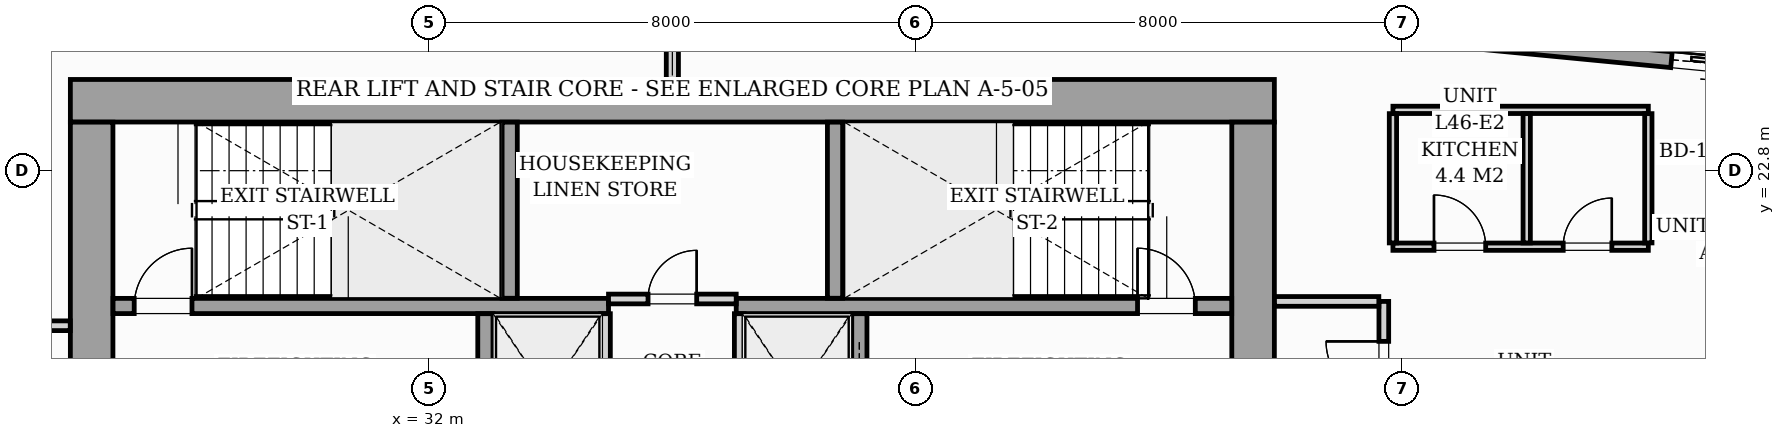
"""IFC4 building model, lengths in metres.
Left out: names, types, materials, properties, quantities, classifications, styles, units other than length and angle.
Written with IfcOpenShell. Run it as: python <this file> out.ifc"""

import sys

from ifc_helpers import new_model, si_unit, direction, frame, frame_2d, origin, origin_2d, place, context, subcontext, project, spatial, rectangle, i_section, extrude, source, transform, mapped, element, fill, save


model = new_model("IFC4")
c1 = context("Model", 3, precision=1e-05, world=origin(), true_north=direction((0.0, 1.0)))
c2 = subcontext(c1, "Body", "Model", "MODEL_VIEW")
j1 = project(units=[si_unit("LENGTHUNIT", "METRE"), si_unit("PLANEANGLEUNIT", "RADIAN")], contexts=[c1])
p1 = place(None, origin())
s1 = spatial("IfcSite", under=j1, at=p1, CompositionType="ELEMENT")
p2 = place(p1, origin())
s2 = spatial("IfcBuilding", under=s1, at=p2, CompositionType="ELEMENT")
p3 = place(p2, frame((0.0, 0.0, 159.8)))
s3 = spatial("IfcBuildingStorey", under=s2, at=p3, CompositionType="ELEMENT", Elevation=159.8)
m1 = source(origin(), c2, "Body", "SweptSolid", [
    extrude(i_section(OverallWidth=0.421, OverallDepth=0.465, WebThickness=0.045, FlangeThickness=0.073, FilletRadius=0.018, at=origin_2d()), origin(), (0.0, 0.0, 1.0), 3.196),
])
for number, where, z_axis, x_axis in (
    (1, (26.4, 24.0, 0.002), (0.0, 0.0, 1.0), (1.0, 0.0, 0.0)),
    (2, (33.12, 24.0, 0.002), (0.0, 0.0, 1.0), (1.0, 0.0, 0.0)),
    (3, (38.88, 24.0, 0.002), (0.0, 0.0, 1.0), (1.0, 0.0, 0.0)),
    (4, (45.6, 24.0, 0.002), (0.0, 0.0, 1.0), (1.0, 0.0, 0.0)),
):
    element("IfcColumn", number, at=place(p3, frame(where, z_axis=z_axis, x_axis=x_axis)), inside=s3, PredefinedType="PILASTER", context=c2, shape_type="MappedRepresentation", body=[
        mapped(m1, transform((0.0, 0.0, 0.0), scale=1.0)),
    ])
p4 = place(p3, frame((40.983, 25.727, 0.0), z_axis=(0.0, 0.0, 1.0), x_axis=(0.995395844771, -0.095849424686, 0.0)))
e5 = element("IfcWall", 5, at=p4, inside=s3, PredefinedType="STANDARD", context=c2, shape_type="SweptSolid", body=[
    extrude(rectangle(XDim=17.01, YDim=0.26, at=frame_2d((8.505, 0.0))), origin(), (0.0, 0.0, 1.0), 2.9),
])
p5 = place(p4, frame((11.5, 0.0, 0.0)))
e6 = element("IfcOpeningElement", 6, at=p5, cuts=e5, PredefinedType="OPENING", context=c2, shape_type="SweptSolid", body=[
    extrude(rectangle(XDim=1.8, YDim=2.06, at=frame_2d((0.9, 1.03))), frame((0.0, 0.14, 0.0), z_axis=(0.0, -1.0, 0.0), x_axis=(1.0, 0.0, 0.0)), (0.0, 0.0, 1.0), 0.28),
])
p6 = place(p4, frame((0.7, 0.0, 0.65)))
e7 = element("IfcOpeningElement", 7, at=p6, cuts=e5, PredefinedType="OPENING", context=c2, shape_type="SweptSolid", body=[
    extrude(rectangle(XDim=1.6, YDim=1.5, at=frame_2d((0.8, 0.75))), frame((0.0, 0.14, 0.0), z_axis=(0.0, -1.0, 0.0), x_axis=(1.0, 0.0, 0.0)), (0.0, 0.0, 1.0), 0.28),
])
p7 = place(p3, frame((26.1, 23.95, 0.0), z_axis=(0.0, 0.0, 1.0), x_axis=(1.0, 0.0, 0.0)))
e8 = element("IfcWall", 8, at=p7, inside=s3, PredefinedType="SHEAR", context=c2, shape_type="SweptSolid", body=[
    extrude(rectangle(XDim=19.8, YDim=0.7, at=frame_2d((9.9, 0.0))), origin(), (0.0, 0.0, 1.0), 3.2),
])
for number, where, z_axis, x_axis in (
    (9, (26.45, 17.802, 0.0), (0.0, 0.0, 1.0), (0.0, 1.0, 0.0)),
    (10, (45.55, 17.802, 0.0), (0.0, 0.0, 1.0), (0.0, 1.0, 0.0)),
):
    element("IfcWall", number, at=place(p3, frame(where, z_axis=z_axis, x_axis=x_axis)), inside=s3, PredefinedType="SHEAR", context=c2, shape_type="SweptSolid", body=[
        extrude(rectangle(XDim=5.796, YDim=0.7, at=frame_2d((2.898, 0.0))), origin(), (0.0, 0.0, 1.0), 3.2),
    ])
p8 = place(p3, frame((26.802, 20.575, 0.0), z_axis=(0.0, 0.0, 1.0), x_axis=(1.0, 0.0, 0.0)))
e11 = element("IfcWall", 11, at=p8, inside=s3, PredefinedType="SOLIDWALL", context=c2, shape_type="SweptSolid", body=[
    extrude(rectangle(XDim=8.148, YDim=0.25, at=frame_2d((4.074, 0.0))), origin(), (0.0, 0.0, 1.0), 3.2),
])
p9 = place(p8, frame((0.348, 0.0, 0.0)))
e12 = element("IfcOpeningElement", 12, at=p9, cuts=e11, PredefinedType="OPENING", context=c2, shape_type="SweptSolid", body=[
    extrude(rectangle(XDim=0.95, YDim=2.06, at=frame_2d((0.475, 1.03))), frame((0.0, 0.135, 0.0), z_axis=(0.0, -1.0, 0.0), x_axis=(1.0, 0.0, 0.0)), (0.0, 0.0, 1.0), 0.27),
])
p10 = place(p3, frame((37.05, 20.575, 0.0), z_axis=(0.0, 0.0, 1.0), x_axis=(1.0, 0.0, 0.0)))
e13 = element("IfcWall", 13, at=p10, inside=s3, PredefinedType="SOLIDWALL", context=c2, shape_type="SweptSolid", body=[
    extrude(rectangle(XDim=8.148, YDim=0.25, at=frame_2d((4.074, 0.0))), origin(), (0.0, 0.0, 1.0), 3.2),
])
p11 = place(p10, frame((6.6, 0.0, 0.0)))
e14 = element("IfcOpeningElement", 14, at=p11, cuts=e13, PredefinedType="OPENING", context=c2, shape_type="SweptSolid", body=[
    extrude(rectangle(XDim=0.95, YDim=2.06, at=frame_2d((0.475, 1.03))), frame((0.0, 0.135, 0.0), z_axis=(0.0, -1.0, 0.0), x_axis=(1.0, 0.0, 0.0)), (0.0, 0.0, 1.0), 0.27),
])
for number, where, z_axis, x_axis in (
    (15, (33.325, 20.702, 0.0), (0.0, 0.0, 1.0), (0.0, 1.0, 0.0)),
    (16, (38.675, 20.702, 0.0), (0.0, 0.0, 1.0), (0.0, 1.0, 0.0)),
):
    element("IfcWall", number, at=place(p3, frame(where, z_axis=z_axis, x_axis=x_axis)), inside=s3, PredefinedType="SOLIDWALL", context=c2, shape_type="SweptSolid", body=[
        extrude(rectangle(XDim=2.896, YDim=0.25, at=frame_2d((1.448, 0.0))), origin(), (0.0, 0.0, 1.0), 3.2),
    ])
p12 = place(p3, frame((32.925, 17.802, 0.0), z_axis=(0.0, 0.0, 1.0), x_axis=(0.0, 1.0, 0.0)))
e17 = element("IfcWall", 17, at=p12, inside=s3, PredefinedType="SOLIDWALL", context=c2, shape_type="SweptSolid", body=[
    extrude(rectangle(XDim=2.646, YDim=0.25, at=frame_2d((1.323, 0.0))), origin(), (0.0, 0.0, 1.0), 3.2),
])
p13 = place(p12, frame((0.598, 0.0, 0.0)))
e18 = element("IfcOpeningElement", 18, at=p13, cuts=e17, PredefinedType="OPENING", context=c2, shape_type="SweptSolid", body=[
    extrude(rectangle(XDim=1.1, YDim=2.08, at=frame_2d((0.55, 1.04))), frame((0.0, 0.135, 0.0), z_axis=(0.0, -1.0, 0.0), x_axis=(1.0, 0.0, 0.0)), (0.0, 0.0, 1.0), 0.27),
])
for number, where, z_axis, x_axis in (
    (19, (34.9, 17.802, 0.0), (0.0, 0.0, 1.0), (0.0, 1.0, 0.0)),
    (20, (37.1, 17.802, 0.0), (0.0, 0.0, 1.0), (0.0, 1.0, 0.0)),
):
    element("IfcWall", number, at=place(p3, frame(where, z_axis=z_axis, x_axis=x_axis)), inside=s3, PredefinedType="PARTITIONING", context=c2, shape_type="SweptSolid", body=[
        extrude(rectangle(XDim=2.646, YDim=0.16, at=frame_2d((1.323, 0.0))), origin(), (0.0, 0.0, 1.0), 2.9),
    ])
p14 = place(p3, frame((39.075, 17.802, 0.0), z_axis=(0.0, 0.0, 1.0), x_axis=(0.0, 1.0, 0.0)))
e21 = element("IfcWall", 21, at=p14, inside=s3, PredefinedType="SOLIDWALL", context=c2, shape_type="SweptSolid", body=[
    extrude(rectangle(XDim=2.646, YDim=0.25, at=frame_2d((1.323, 0.0))), origin(), (0.0, 0.0, 1.0), 3.2),
])
p15 = place(p14, frame((0.598, 0.0, 0.0)))
e22 = element("IfcOpeningElement", 22, at=p15, cuts=e21, PredefinedType="OPENING", context=c2, shape_type="SweptSolid", body=[
    extrude(rectangle(XDim=1.1, YDim=2.08, at=frame_2d((0.55, 1.04))), frame((0.0, 0.135, 0.0), z_axis=(0.0, -1.0, 0.0), x_axis=(1.0, 0.0, 0.0)), (0.0, 0.0, 1.0), 0.27),
])
p16 = place(p3, frame((34.95, 20.69, 0.0), z_axis=(0.0, 0.0, 1.0), x_axis=(1.0, 0.0, 0.0)))
e23 = element("IfcWall", 23, at=p16, inside=s3, PredefinedType="PARTITIONING", context=c2, shape_type="SweptSolid", body=[
    extrude(rectangle(XDim=2.1, YDim=0.16, at=frame_2d((1.05, 0.0))), origin(), (0.0, 0.0, 1.0), 2.9),
])
p17 = place(p16, frame((0.65, 0.0, 0.0)))
e24 = element("IfcOpeningElement", 24, at=p17, cuts=e23, PredefinedType="OPENING", context=c2, shape_type="SweptSolid", body=[
    extrude(rectangle(XDim=0.8, YDim=2.05, at=frame_2d((0.4, 1.025))), frame((0.0, 0.09, 0.0), z_axis=(0.0, -1.0, 0.0), x_axis=(1.0, 0.0, 0.0)), (0.0, 0.0, 1.0), 0.18),
])
p18 = place(p3, frame((47.7, 12.732, 0.0), z_axis=(0.0, 0.0, 1.0), x_axis=(0.0, 1.0, 0.0)))
e25 = element("IfcWall", 25, at=p18, inside=s3, PredefinedType="PARTITIONING", context=c2, shape_type="SweptSolid", body=[
    extrude(rectangle(XDim=7.918, YDim=0.16, at=frame_2d((3.959, 0.0))), origin(), (0.0, 0.0, 1.0), 2.9),
])
p19 = place(p18, frame((0.493, 0.0, 0.0)))
e26 = element("IfcOpeningElement", 26, at=p19, cuts=e25, PredefinedType="OPENING", context=c2, shape_type="SweptSolid", body=[
    extrude(rectangle(XDim=0.85, YDim=2.0, at=frame_2d((0.425, 1.0))), frame((0.0, 0.09, 0.0), z_axis=(0.0, -1.0, 0.0), x_axis=(1.0, 0.0, 0.0)), (0.0, 0.0, 1.0), 0.18),
])
p20 = place(p18, frame((6.311, 0.0, 0.0)))
e27 = element("IfcOpeningElement", 27, at=p20, cuts=e25, PredefinedType="OPENING", context=c2, shape_type="SweptSolid", body=[
    extrude(rectangle(XDim=0.95, YDim=2.06, at=frame_2d((0.475, 1.03))), frame((0.0, 0.09, 0.0), z_axis=(0.0, -1.0, 0.0), x_axis=(1.0, 0.0, 0.0)), (0.0, 0.0, 1.0), 0.18),
])
p21 = place(p3, frame((36.0, 24.302, 0.0), z_axis=(0.0, 0.0, 1.0), x_axis=(0.0, 1.0, 0.0)))
e28 = element("IfcWall", 28, at=p21, inside=s3, PredefinedType="PARTITIONING", context=c2, shape_type="SweptSolid", body=[
    extrude(rectangle(XDim=1.955, YDim=0.2, at=frame_2d((0.978, 0.0))), origin(), (0.0, 0.0, 1.0), 2.9),
])
p22 = place(p3, frame((45.902, 20.65, 0.0), z_axis=(0.0, 0.0, 1.0), x_axis=(1.0, 0.0, 0.0)))
e29 = element("IfcWall", 29, at=p22, inside=s3, PredefinedType="PARTITIONING", context=c2, shape_type="SweptSolid", body=[
    extrude(rectangle(XDim=1.716, YDim=0.16, at=frame_2d((0.858, 0.0))), origin(), (0.0, 0.0, 1.0), 2.9),
])
p23 = place(p3, frame((47.85, 21.55, 0.0), z_axis=(0.0, 0.0, 1.0), x_axis=(1.0, 0.0, 0.0)))
e30 = element("IfcWall", 30, at=p23, inside=s3, PredefinedType="PARTITIONING", context=c2, shape_type="SweptSolid", body=[
    extrude(rectangle(XDim=4.2, YDim=0.12, at=frame_2d((2.1, 0.0))), origin(), (0.0, 0.0, 1.0), 2.9),
])
p24 = place(p23, frame((0.675, 0.0, 0.0)))
e31 = element("IfcOpeningElement", 31, at=p24, cuts=e30, PredefinedType="OPENING", context=c2, shape_type="SweptSolid", body=[
    extrude(rectangle(XDim=0.85, YDim=2.05, at=frame_2d((0.425, 1.025))), frame((0.0, 0.07, 0.0), z_axis=(0.0, -1.0, 0.0), x_axis=(1.0, 0.0, 0.0)), (0.0, 0.0, 1.0), 0.14),
])
p25 = place(p23, frame((2.8, 0.0, 0.0)))
e32 = element("IfcOpeningElement", 32, at=p25, cuts=e30, PredefinedType="OPENING", context=c2, shape_type="SweptSolid", body=[
    extrude(rectangle(XDim=0.8, YDim=2.02, at=frame_2d((0.4, 1.01))), frame((0.0, 0.07, 0.0), z_axis=(0.0, -1.0, 0.0), x_axis=(1.0, 0.0, 0.0)), (0.0, 0.0, 1.0), 0.14),
])
p26 = place(p3, frame((47.85, 23.8, 0.0), z_axis=(0.0, 0.0, 1.0), x_axis=(1.0, 0.0, 0.0)))
e33 = element("IfcWall", 33, at=p26, inside=s3, PredefinedType="PARTITIONING", context=c2, shape_type="SweptSolid", body=[
    extrude(rectangle(XDim=4.2, YDim=0.12, at=frame_2d((2.1, 0.0))), origin(), (0.0, 0.0, 1.0), 2.176),
])
for number, where, z_axis, x_axis in (
    (34, (47.85, 21.612, 0.0), (0.0, 0.0, 1.0), (0.0, 1.0, 0.0)),
    (35, (50.05, 21.612, 0.0), (0.0, 0.0, 1.0), (0.0, 1.0, 0.0)),
    (36, (52.05, 21.612, 0.0), (0.0, 0.0, 1.0), (0.0, 1.0, 0.0)),
):
    element("IfcWall", number, at=place(p3, frame(where, z_axis=z_axis, x_axis=x_axis)), inside=s3, PredefinedType="PARTITIONING", context=c2, shape_type="SweptSolid", body=[
        extrude(rectangle(XDim=2.126, YDim=0.12, at=frame_2d((1.063, 0.0))), origin(), (0.0, 0.0, 1.0), 2.9),
    ])
p27 = place(p3, frame((24.182, 20.25, 0.0), z_axis=(0.0, 0.0, 1.0), x_axis=(1.0, 0.0, 0.0)))
e37 = element("IfcWall", 37, at=p27, inside=s3, PredefinedType="PARTITIONING", context=c2, shape_type="SweptSolid", body=[
    extrude(rectangle(XDim=1.916, YDim=0.16, at=frame_2d((0.958, 0.0))), origin(), (0.0, 0.0, 1.0), 2.9),
])
m2 = source(origin(), c2, "Body", "SweptSolid", [
    extrude(rectangle(XDim=1.8, YDim=2.06, at=frame_2d((0.9, 1.03))), frame((0.0, 0.025, 0.0), z_axis=(0.0, -1.0, 0.0), x_axis=(1.0, 0.0, 0.0)), (0.0, 0.0, 1.0), 0.05),
])
p28 = place(p5, origin())
e38 = element("IfcDoor", 38, at=p28, inside=s3, OperationType="SLIDING_TO_RIGHT", PredefinedType="DOOR", context=c2, shape_type="MappedRepresentation", body=[
    mapped(m2, transform((0.0, 0.0, 0.0), scale=1.0)),
])
fill(e6, e38)
m3 = source(origin(), c2, "Body", "SweptSolid", [
    extrude(rectangle(XDim=0.95, YDim=2.06, at=frame_2d((0.475, 1.03))), frame((0.0, 0.025, 0.0), z_axis=(0.0, -1.0, 0.0), x_axis=(1.0, 0.0, 0.0)), (0.0, 0.0, 1.0), 0.05),
])
p29 = place(p9, origin())
e39 = element("IfcDoor", 39, at=p29, inside=s3, OperationType="SINGLE_SWING_RIGHT", PredefinedType="DOOR", context=c2, shape_type="MappedRepresentation", body=[
    mapped(m3, transform((0.0, 0.0, 0.0), scale=1.0)),
])
fill(e12, e39)
p30 = place(p11, origin())
e40 = element("IfcDoor", 40, at=p30, inside=s3, OperationType="SINGLE_SWING_LEFT", PredefinedType="DOOR", context=c2, shape_type="MappedRepresentation", body=[
    mapped(m3, transform((0.0, 0.0, 0.0), scale=1.0)),
])
fill(e14, e40)
m4 = source(origin(), c2, "Body", "SweptSolid", [
    extrude(rectangle(XDim=0.8, YDim=2.05, at=frame_2d((0.4, 1.025))), frame((0.0, 0.025, 0.0), z_axis=(0.0, -1.0, 0.0), x_axis=(1.0, 0.0, 0.0)), (0.0, 0.0, 1.0), 0.05),
])
p31 = place(p17, origin())
e41 = element("IfcDoor", 41, at=p31, inside=s3, OperationType="SINGLE_SWING_RIGHT", PredefinedType="DOOR", context=c2, shape_type="MappedRepresentation", body=[
    mapped(m4, transform((0.0, 0.0, 0.0), scale=1.0)),
])
fill(e24, e41)
m5 = source(origin(), c2, "Body", "SweptSolid", [
    extrude(rectangle(XDim=0.95, YDim=2.06, at=frame_2d((0.475, 1.03))), frame((0.0, 0.025, 0.0), z_axis=(0.0, -1.0, 0.0), x_axis=(1.0, 0.0, 0.0)), (0.0, 0.0, 1.0), 0.05),
])
p32 = place(p20, origin())
e42 = element("IfcDoor", 42, at=p32, inside=s3, OperationType="SINGLE_SWING_RIGHT", PredefinedType="DOOR", context=c2, shape_type="MappedRepresentation", body=[
    mapped(m5, transform((0.0, 0.0, 0.0), scale=1.0)),
])
fill(e27, e42)
m6 = source(origin(), c2, "Body", "SweptSolid", [
    extrude(rectangle(XDim=0.85, YDim=2.05, at=frame_2d((0.425, 1.025))), frame((0.0, 0.025, 0.0), z_axis=(0.0, -1.0, 0.0), x_axis=(1.0, 0.0, 0.0)), (0.0, 0.0, 1.0), 0.05),
])
p33 = place(p24, origin())
e43 = element("IfcDoor", 43, at=p33, inside=s3, OperationType="SINGLE_SWING_LEFT", PredefinedType="DOOR", context=c2, shape_type="MappedRepresentation", body=[
    mapped(m6, transform((0.0, 0.0, 0.0), scale=1.0)),
])
fill(e31, e43)
m7 = source(origin(), c2, "Body", "SweptSolid", [
    extrude(rectangle(XDim=0.8, YDim=2.02, at=frame_2d((0.4, 1.01))), frame((0.0, 0.025, 0.0), z_axis=(0.0, -1.0, 0.0), x_axis=(1.0, 0.0, 0.0)), (0.0, 0.0, 1.0), 0.05),
])
p34 = place(p25, origin())
e44 = element("IfcDoor", 44, at=p34, inside=s3, OperationType="SINGLE_SWING_RIGHT", PredefinedType="DOOR", context=c2, shape_type="MappedRepresentation", body=[
    mapped(m7, transform((0.0, 0.0, 0.0), scale=1.0)),
])
fill(e32, e44)
save(model, sys.argv[1])
